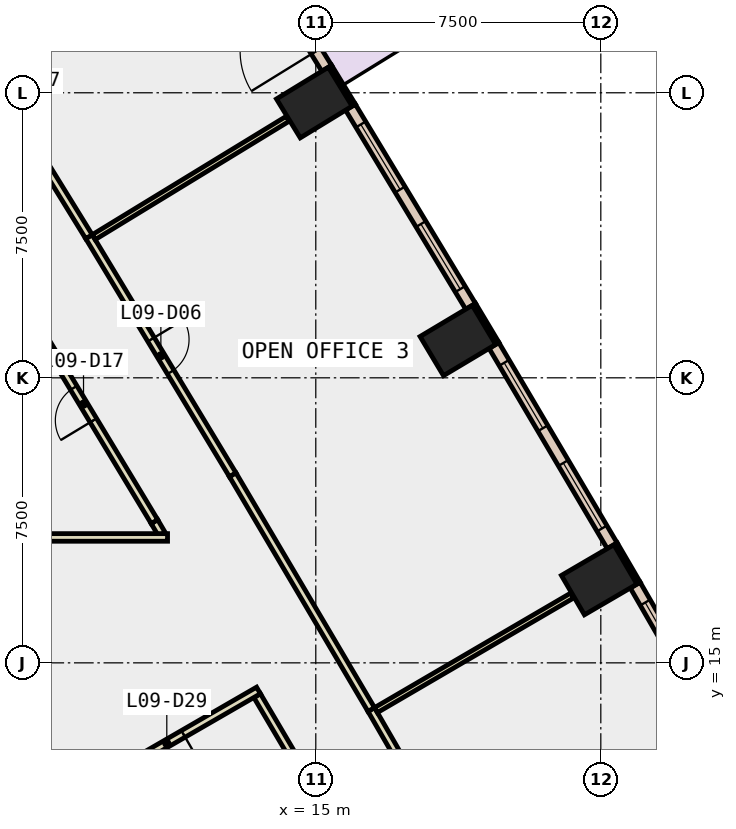
"""IFC4 building model, lengths in metres.
Left out: names, types, materials, properties, quantities, classifications, styles, units other than length and angle.
Written with IfcOpenShell. Run it as: python <this file> out.ifc"""

import sys

from ifc_helpers import new_model, si_unit, direction, frame, frame_2d, origin, origin_2d, place, context, subcontext, project, spatial, polyline, rectangle, outline, extrude, element, fill, save


model = new_model("IFC4")
c1 = context("Model", 3, precision=1e-05, world=origin(), true_north=direction((0.0, 1.0)))
c2 = subcontext(c1, "Body", "Model", "MODEL_VIEW")
j1 = project(units=[si_unit("LENGTHUNIT", "METRE"), si_unit("PLANEANGLEUNIT", "RADIAN")], contexts=[c1])
p1 = place(None, origin())
s1 = spatial("IfcSite", under=j1, at=p1, CompositionType="ELEMENT")
p2 = place(p1, origin())
s2 = spatial("IfcBuilding", under=s1, at=p2, CompositionType="ELEMENT")
p3 = place(p2, frame((0.0, 0.0, 47.6)))
s3 = spatial("IfcBuildingStorey", under=s2, at=p3, CompositionType="ELEMENT", Elevation=47.6)
for number, where, z_axis, x_axis in (
    (1, (22.457, 17.186, -0.4), (0.0, 0.0, 1.0), (-0.504, 0.864, 0.0)),
    (2, (18.739, 23.482, -0.4), (0.0, 0.0, 1.0), (-0.513, 0.858, 0.0)),
    (3, (14.961, 29.743, -0.4), (0.0, 0.0, 1.0), (-0.522, 0.853, 0.0)),
):
    element("IfcColumn", number, at=place(p3, frame(where, z_axis=z_axis, x_axis=x_axis)), inside=s3, PredefinedType="COLUMN", context=c2, shape_type="SweptSolid", body=[
        extrude(rectangle(XDim=1.2, YDim=1.6, at=origin_2d()), origin(), (0.0, 0.0, 1.0), 4.2),
    ])
p4 = place(p3, frame((0.0, 0.0, 3.6)))
e4 = element("IfcWall", 4, at=p4, inside=s3, PredefinedType="SHEAR", context=c2, shape_type="SweptSolid", body=[
    extrude(outline(polyline([(7.517, 13.48), (6.651, 12.98), (7.651, 11.248), (8.517, 11.748), (7.517, 13.48)])), origin(), (0.0, 0.0, 1.0), 0.2),
])
p5 = place(p3, frame((23.493, 17.097, 0.0), z_axis=(0.0, 0.0, 1.0), x_axis=(-0.504225229382, 0.863572184623, 0.0)))
e5 = element("IfcWall", 5, at=p5, inside=s3, PredefinedType="STANDARD", context=c2, shape_type="SweptSolid", body=[
    extrude(rectangle(XDim=1.2, YDim=0.1, at=frame_2d((0.6, 0.0))), origin(), (0.0, 0.0, 1.0), 3.8),
])
for number, where, z_axis, x_axis in (
    (6, (19.777, 23.403, 0.0), (0.0, 0.0, 1.0), (-0.513, 0.858, 0.0)),
    (7, (15.999, 29.674, 0.0), (0.0, 0.0, 1.0), (-0.522, 0.853, 0.0)),
):
    element("IfcWall", number, at=place(p3, frame(where, z_axis=z_axis, x_axis=x_axis)), inside=s3, PredefinedType="STANDARD", context=c2, shape_type="SweptSolid", body=[
        extrude(rectangle(XDim=1.2, YDim=0.1, at=frame_2d((0.6, 0.0))), origin(), (0.0, 0.0, 1.0), 3.8),
    ])
p6 = place(p3, frame((26.464, 11.745, 0.0), z_axis=(0.0, 0.0, 1.0), x_axis=(-0.499957248001, 0.866050085256, 0.0)))
e8 = element("IfcWall", 8, at=p6, inside=s3, PredefinedType="STANDARD", context=c2, shape_type="SweptSolid", body=[
    extrude(rectangle(XDim=6.121, YDim=0.3, at=frame_2d((3.06, 0.0))), origin(), (0.0, 0.0, 1.0), 3.8),
])
p7 = place(p6, frame((0.53, 0.0, 0.9)))
e9 = element("IfcOpeningElement", 9, at=p7, cuts=e8, PredefinedType="OPENING", context=c2, shape_type="SweptSolid", body=[
    extrude(rectangle(XDim=2.0, YDim=2.6, at=frame_2d((1.0, 1.3))), frame((0.0, 0.16, 0.0), z_axis=(0.0, -1.0, 0.0), x_axis=(1.0, 0.0, 0.0)), (0.0, 0.0, 1.0), 0.32),
])
p8 = place(p6, frame((3.591, 0.0, 0.9)))
e10 = element("IfcOpeningElement", 10, at=p8, cuts=e8, PredefinedType="OPENING", context=c2, shape_type="SweptSolid", body=[
    extrude(rectangle(XDim=2.0, YDim=2.6, at=frame_2d((1.0, 1.3))), frame((0.0, 0.16, 0.0), z_axis=(0.0, -1.0, 0.0), x_axis=(1.0, 0.0, 0.0)), (0.0, 0.0, 1.0), 0.32),
])
p9 = place(p3, frame((22.8, 18.08, 0.0), z_axis=(0.0, 0.0, 1.0), x_axis=(-0.508412153373, 0.861113861404, 0.0)))
e11 = element("IfcWall", 11, at=p9, inside=s3, PredefinedType="STANDARD", context=c2, shape_type="SweptSolid", body=[
    extrude(rectangle(XDim=6.121, YDim=0.3, at=frame_2d((3.061, 0.0))), origin(), (0.0, 0.0, 1.0), 3.8),
])
p10 = place(p9, frame((0.53, 0.0, 0.9)))
e12 = element("IfcOpeningElement", 12, at=p10, cuts=e11, PredefinedType="OPENING", context=c2, shape_type="SweptSolid", body=[
    extrude(rectangle(XDim=2.0, YDim=2.6, at=frame_2d((1.0, 1.3))), frame((0.0, 0.16, 0.0), z_axis=(0.0, -1.0, 0.0), x_axis=(1.0, 0.0, 0.0)), (0.0, 0.0, 1.0), 0.32),
])
p11 = place(p9, frame((3.591, 0.0, 0.9)))
e13 = element("IfcOpeningElement", 13, at=p11, cuts=e11, PredefinedType="OPENING", context=c2, shape_type="SweptSolid", body=[
    extrude(rectangle(XDim=2.0, YDim=2.6, at=frame_2d((1.0, 1.3))), frame((0.0, 0.16, 0.0), z_axis=(0.0, -1.0, 0.0), x_axis=(1.0, 0.0, 0.0)), (0.0, 0.0, 1.0), 0.32),
])
p12 = place(p3, frame((19.074, 24.38, 0.0), z_axis=(0.0, 0.0, 1.0), x_axis=(-0.516699243123, 0.856166976796, 0.0)))
e14 = element("IfcWall", 14, at=p12, inside=s3, PredefinedType="STANDARD", context=c2, shape_type="SweptSolid", body=[
    extrude(rectangle(XDim=6.122, YDim=0.3, at=frame_2d((3.061, 0.0))), origin(), (0.0, 0.0, 1.0), 3.8),
])
p13 = place(p12, frame((0.53, 0.0, 0.9)))
e15 = element("IfcOpeningElement", 15, at=p13, cuts=e14, PredefinedType="OPENING", context=c2, shape_type="SweptSolid", body=[
    extrude(rectangle(XDim=2.0, YDim=2.6, at=frame_2d((1.0, 1.3))), frame((0.0, 0.16, 0.0), z_axis=(0.0, -1.0, 0.0), x_axis=(1.0, 0.0, 0.0)), (0.0, 0.0, 1.0), 0.32),
])
p14 = place(p12, frame((3.591, 0.0, 0.9)))
e16 = element("IfcOpeningElement", 16, at=p14, cuts=e14, PredefinedType="OPENING", context=c2, shape_type="SweptSolid", body=[
    extrude(rectangle(XDim=2.0, YDim=2.6, at=frame_2d((1.0, 1.3))), frame((0.0, 0.16, 0.0), z_axis=(0.0, -1.0, 0.0), x_axis=(1.0, 0.0, 0.0)), (0.0, 0.0, 1.0), 0.32),
])
p15 = place(p3, frame((15.287, 30.644, 0.0), z_axis=(0.0, 0.0, 1.0), x_axis=(-0.525114088226, 0.851031840971, 0.0)))
e17 = element("IfcWall", 17, at=p15, inside=s3, PredefinedType="STANDARD", context=c2, shape_type="SweptSolid", body=[
    extrude(rectangle(XDim=6.121, YDim=0.3, at=frame_2d((3.061, 0.0))), origin(), (0.0, 0.0, 1.0), 3.8),
])
p16 = place(p15, frame((0.53, 0.0, 0.0)))
e18 = element("IfcOpeningElement", 18, at=p16, cuts=e17, PredefinedType="OPENING", context=c2, shape_type="SweptSolid", body=[
    extrude(rectangle(XDim=2.0, YDim=2.4, at=frame_2d((1.0, 1.2))), frame((0.0, 0.16, 0.0), z_axis=(0.0, -1.0, 0.0), x_axis=(1.0, 0.0, 0.0)), (0.0, 0.0, 1.0), 0.32),
])
p17 = place(p15, frame((3.591, 0.0, 0.9)))
e19 = element("IfcOpeningElement", 19, at=p17, cuts=e17, PredefinedType="OPENING", context=c2, shape_type="SweptSolid", body=[
    extrude(rectangle(XDim=2.0, YDim=2.6, at=frame_2d((1.0, 1.3))), frame((0.0, 0.16, 0.0), z_axis=(0.0, -1.0, 0.0), x_axis=(1.0, 0.0, 0.0)), (0.0, 0.0, 1.0), 0.32),
])
p18 = place(p3, frame((14.425, 12.497, 0.0), z_axis=(0.0, 0.0, 1.0), x_axis=(-0.508111788435, 0.861291129905, 0.0)))
e20 = element("IfcWall", 20, at=p18, inside=s3, PredefinedType="PARTITIONING", context=c2, shape_type="SweptSolid", body=[
    extrude(rectangle(XDim=1.905, YDim=0.2, at=frame_2d((0.953, 0.0))), origin(), (0.0, 0.0, 1.0), 3.8),
])
p19 = place(p3, frame((13.492, 14.274, 0.0), z_axis=(0.0, 0.0, 1.0), x_axis=(-0.866003598361, -0.5000377662, 0.0)))
e21 = element("IfcWall", 21, at=p19, inside=s3, PredefinedType="PARTITIONING", context=c2, shape_type="SweptSolid", body=[
    extrude(rectangle(XDim=5.071, YDim=0.2, at=frame_2d((2.536, 0.0))), origin(), (0.0, 0.0, 1.0), 3.8),
])
p20 = place(p19, frame((2.286, 0.0, 0.0)))
e22 = element("IfcOpeningElement", 22, at=p20, cuts=e21, PredefinedType="OPENING", context=c2, shape_type="SweptSolid", body=[
    extrude(rectangle(XDim=1.0, YDim=2.1, at=frame_2d((0.5, 1.05))), frame((0.0, 0.11, 0.0), z_axis=(0.0, -1.0, 0.0), x_axis=(1.0, 0.0, 0.0)), (0.0, 0.0, 1.0), 0.22),
])
p21 = place(p3, frame((10.948, 18.386, 0.0), z_axis=(0.0, 0.0, 1.0), x_axis=(-0.506880801681, 0.862016155815, 0.0)))
e23 = element("IfcWall", 23, at=p21, inside=s3, PredefinedType="PARTITIONING", context=c2, shape_type="SweptSolid", body=[
    extrude(rectangle(XDim=0.383, YDim=0.2, at=frame_2d((0.191, 0.0))), origin(), (0.0, 0.0, 1.0), 3.8),
])
p22 = place(p3, frame((10.754, 18.716, 0.0), z_axis=(0.0, 0.0, 1.0), x_axis=(-0.516755973305, 0.856132737403, 0.0)))
e24 = element("IfcWall", 24, at=p22, inside=s3, PredefinedType="PARTITIONING", context=c2, shape_type="SweptSolid", body=[
    extrude(rectangle(XDim=7.222, YDim=0.2, at=frame_2d((3.611, 0.0))), origin(), (0.0, 0.0, 1.0), 3.8),
])
p23 = place(p22, frame((3.111, 0.0, 0.0)))
e25 = element("IfcOpeningElement", 25, at=p23, cuts=e24, PredefinedType="OPENING", context=c2, shape_type="SweptSolid", body=[
    extrude(rectangle(XDim=1.0, YDim=2.1, at=frame_2d((0.5, 1.05))), frame((0.0, 0.11, 0.0), z_axis=(0.0, -1.0, 0.0), x_axis=(1.0, 0.0, 0.0)), (0.0, 0.0, 1.0), 0.22),
])
p24 = place(p3, frame((16.46, 13.772, 0.0), z_axis=(0.0, 0.0, 1.0), x_axis=(0.500099745063, -0.865967808286, 0.0)))
e26 = element("IfcWall", 26, at=p24, inside=s3, PredefinedType="PARTITIONING", context=c2, shape_type="SweptSolid", body=[
    extrude(rectangle(XDim=7.319, YDim=0.2, at=frame_2d((3.659, 0.0))), origin(), (0.0, 0.0, 1.0), 3.8),
])
p25 = place(p24, frame((3.159, 0.0, 0.0)))
e27 = element("IfcOpeningElement", 27, at=p25, cuts=e26, PredefinedType="OPENING", context=c2, shape_type="SweptSolid", body=[
    extrude(rectangle(XDim=1.0, YDim=2.1, at=frame_2d((0.5, 1.05))), frame((0.0, 0.11, 0.0), z_axis=(0.0, -1.0, 0.0), x_axis=(1.0, 0.0, 0.0)), (0.0, 0.0, 1.0), 0.22),
])
p26 = place(p3, frame((9.032, 26.213, 0.0), z_axis=(0.0, 0.0, 1.0), x_axis=(0.516789314756, -0.856112611841, 0.0)))
e28 = element("IfcWall", 28, at=p26, inside=s3, PredefinedType="PARTITIONING", context=c2, shape_type="SweptSolid", body=[
    extrude(rectangle(XDim=7.32, YDim=0.2, at=frame_2d((3.66, 0.0))), origin(), (0.0, 0.0, 1.0), 3.8),
])
p27 = place(p26, frame((3.16, 0.0, 0.0)))
e29 = element("IfcOpeningElement", 29, at=p27, cuts=e28, PredefinedType="OPENING", context=c2, shape_type="SweptSolid", body=[
    extrude(rectangle(XDim=1.0, YDim=2.1, at=frame_2d((0.5, 1.05))), frame((0.0, 0.11, 0.0), z_axis=(0.0, -1.0, 0.0), x_axis=(1.0, 0.0, 0.0)), (0.0, 0.0, 1.0), 0.22),
])
p28 = place(p3, frame((12.815, 19.946, 0.0), z_axis=(0.0, 0.0, 1.0), x_axis=(0.508287536166, -0.861187424768, 0.0)))
e30 = element("IfcWall", 30, at=p28, inside=s3, PredefinedType="PARTITIONING", context=c2, shape_type="SweptSolid", body=[
    extrude(rectangle(XDim=7.169, YDim=0.2, at=frame_2d((3.584, 0.0))), origin(), (0.0, 0.0, 1.0), 3.8),
])
p29 = place(p3, frame((5.267, 32.315, 0.0), z_axis=(0.0, 0.0, 1.0), x_axis=(0.524988204957, -0.851109502153, 0.0)))
e31 = element("IfcWall", 31, at=p29, inside=s3, PredefinedType="PARTITIONING", context=c2, shape_type="SweptSolid", body=[
    extrude(rectangle(XDim=7.169, YDim=0.2, at=frame_2d((3.585, 0.0))), origin(), (0.0, 0.0, 1.0), 3.8),
])
p30 = place(p29, frame((3.16, 0.0, 0.0)))
e32 = element("IfcOpeningElement", 32, at=p30, cuts=e31, PredefinedType="OPENING", context=c2, shape_type="SweptSolid", body=[
    extrude(rectangle(XDim=1.0, YDim=2.1, at=frame_2d((0.5, 1.05))), frame((0.0, 0.11, 0.0), z_axis=(0.0, -1.0, 0.0), x_axis=(1.0, 0.0, 0.0)), (0.0, 0.0, 1.0), 0.22),
])
p31 = place(p3, frame((0.4, 18.3, 0.0), z_axis=(0.0, 0.0, 1.0), x_axis=(1.0, 0.0, 0.0)))
e33 = element("IfcWall", 33, at=p31, inside=s3, PredefinedType="PARTITIONING", context=c2, shape_type="SweptSolid", body=[
    extrude(rectangle(XDim=10.699, YDim=0.2, at=frame_2d((5.35, 0.0))), origin(), (0.0, 0.0, 1.0), 3.8),
])
p32 = place(p3, frame((16.584, 13.757, 0.0), z_axis=(0.0, 0.0, 1.0), x_axis=(0.863565634474, 0.504236447469, 0.0)))
e34 = element("IfcWall", 34, at=p32, inside=s3, PredefinedType="PARTITIONING", context=c2, shape_type="SweptSolid", body=[
    extrude(rectangle(XDim=5.981, YDim=0.15, at=frame_2d((2.99, 0.0))), origin(), (0.0, 0.0, 1.0), 3.8),
])
p33 = place(p3, frame((9.156, 26.201, 0.0), z_axis=(0.0, 0.0, 1.0), x_axis=(0.853632819511, 0.520875234057, 0.0)))
e35 = element("IfcWall", 35, at=p33, inside=s3, PredefinedType="PARTITIONING", context=c2, shape_type="SweptSolid", body=[
    extrude(rectangle(XDim=5.98, YDim=0.15, at=frame_2d((2.99, 0.0))), origin(), (0.0, 0.0, 1.0), 3.8),
])
p34 = place(p3, frame((8.43, 11.698, 0.0), z_axis=(0.0, 0.0, 1.0), x_axis=(-0.50002537861, 0.866010750942, 0.0)))
e36 = element("IfcWall", 36, at=p34, inside=s3, PredefinedType="PARTITIONING", context=c2, shape_type="SweptSolid", body=[
    extrude(rectangle(XDim=2.0, YDim=0.2, at=frame_2d((1.0, 0.0))), origin(), (0.0, 0.0, 1.0), 2.4),
])
p35 = place(p34, frame((0.19, 0.0, 0.0)))
e37 = element("IfcOpeningElement", 37, at=p35, cuts=e36, PredefinedType="OPENING", context=c2, shape_type="SweptSolid", body=[
    extrude(rectangle(XDim=1.8, YDim=2.1, at=frame_2d((0.9, 1.05))), frame((0.0, 0.11, 0.0), z_axis=(0.0, -1.0, 0.0), x_axis=(1.0, 0.0, 0.0)), (0.0, 0.0, 1.0), 0.22),
])
p36 = place(p8, origin())
e38 = element("IfcWindow", 38, at=p36, inside=s3, PartitioningType="SINGLE_PANEL", PredefinedType="WINDOW", context=c2, shape_type="SweptSolid", body=[
    extrude(rectangle(XDim=2.0, YDim=2.6, at=frame_2d((1.0, 1.3))), frame((0.0, 0.03, 0.0), z_axis=(0.0, -1.0, 0.0), x_axis=(1.0, 0.0, 0.0)), (0.0, 0.0, 1.0), 0.06),
])
fill(e10, e38)
p37 = place(p10, origin())
e39 = element("IfcWindow", 39, at=p37, inside=s3, PartitioningType="SINGLE_PANEL", PredefinedType="WINDOW", context=c2, shape_type="SweptSolid", body=[
    extrude(rectangle(XDim=2.0, YDim=2.6, at=frame_2d((1.0, 1.3))), frame((0.0, 0.03, 0.0), z_axis=(0.0, -1.0, 0.0), x_axis=(1.0, 0.0, 0.0)), (0.0, 0.0, 1.0), 0.06),
])
fill(e12, e39)
p38 = place(p11, origin())
e40 = element("IfcWindow", 40, at=p38, inside=s3, PartitioningType="SINGLE_PANEL", PredefinedType="WINDOW", context=c2, shape_type="SweptSolid", body=[
    extrude(rectangle(XDim=2.0, YDim=2.6, at=frame_2d((1.0, 1.3))), frame((0.0, 0.03, 0.0), z_axis=(0.0, -1.0, 0.0), x_axis=(1.0, 0.0, 0.0)), (0.0, 0.0, 1.0), 0.06),
])
fill(e13, e40)
p39 = place(p13, origin())
e41 = element("IfcWindow", 41, at=p39, inside=s3, PartitioningType="SINGLE_PANEL", PredefinedType="WINDOW", context=c2, shape_type="SweptSolid", body=[
    extrude(rectangle(XDim=2.0, YDim=2.6, at=frame_2d((1.0, 1.3))), frame((0.0, 0.03, 0.0), z_axis=(0.0, -1.0, 0.0), x_axis=(1.0, 0.0, 0.0)), (0.0, 0.0, 1.0), 0.06),
])
fill(e15, e41)
p40 = place(p14, origin())
e42 = element("IfcWindow", 42, at=p40, inside=s3, PartitioningType="SINGLE_PANEL", PredefinedType="WINDOW", context=c2, shape_type="SweptSolid", body=[
    extrude(rectangle(XDim=2.0, YDim=2.6, at=frame_2d((1.0, 1.3))), frame((0.0, 0.03, 0.0), z_axis=(0.0, -1.0, 0.0), x_axis=(1.0, 0.0, 0.0)), (0.0, 0.0, 1.0), 0.06),
])
fill(e16, e42)
p41 = place(p27, origin())
e43 = element("IfcDoor", 43, at=p41, inside=s3, OperationType="SINGLE_SWING_LEFT", PredefinedType="DOOR", context=c2, shape_type="SweptSolid", body=[
    extrude(rectangle(XDim=1.0, YDim=2.1, at=frame_2d((0.5, 1.05))), frame((0.0, 0.025, 0.0), z_axis=(0.0, -1.0, 0.0), x_axis=(1.0, 0.0, 0.0)), (0.0, 0.0, 1.0), 0.05),
])
fill(e29, e43)
p42 = place(p23, origin())
e44 = element("IfcDoor", 44, at=p42, inside=s3, OperationType="SINGLE_SWING_LEFT", PredefinedType="DOOR", context=c2, shape_type="SweptSolid", body=[
    extrude(rectangle(XDim=1.0, YDim=2.1, at=frame_2d((0.5, 1.05))), frame((0.0, 0.025, 0.0), z_axis=(0.0, -1.0, 0.0), x_axis=(1.0, 0.0, 0.0)), (0.0, 0.0, 1.0), 0.05),
])
fill(e25, e44)
p43 = place(p20, origin())
e45 = element("IfcDoor", 45, at=p43, inside=s3, OperationType="SINGLE_SWING_LEFT", PredefinedType="DOOR", context=c2, shape_type="SweptSolid", body=[
    extrude(rectangle(XDim=1.0, YDim=2.1, at=frame_2d((0.5, 1.05))), frame((0.0, 0.025, 0.0), z_axis=(0.0, -1.0, 0.0), x_axis=(1.0, 0.0, 0.0)), (0.0, 0.0, 1.0), 0.05),
])
fill(e22, e45)
p44 = place(p35, origin())
e46 = element("IfcDoor", 46, at=p44, inside=s3, OperationType="DOUBLE_DOOR_SINGLE_SWING", PredefinedType="DOOR", context=c2, shape_type="SweptSolid", body=[
    extrude(rectangle(XDim=1.8, YDim=2.1, at=frame_2d((0.9, 1.05))), frame((0.0, 0.025, 0.0), z_axis=(0.0, -1.0, 0.0), x_axis=(1.0, 0.0, 0.0)), (0.0, 0.0, 1.0), 0.05),
])
fill(e37, e46)
save(model, sys.argv[1])
